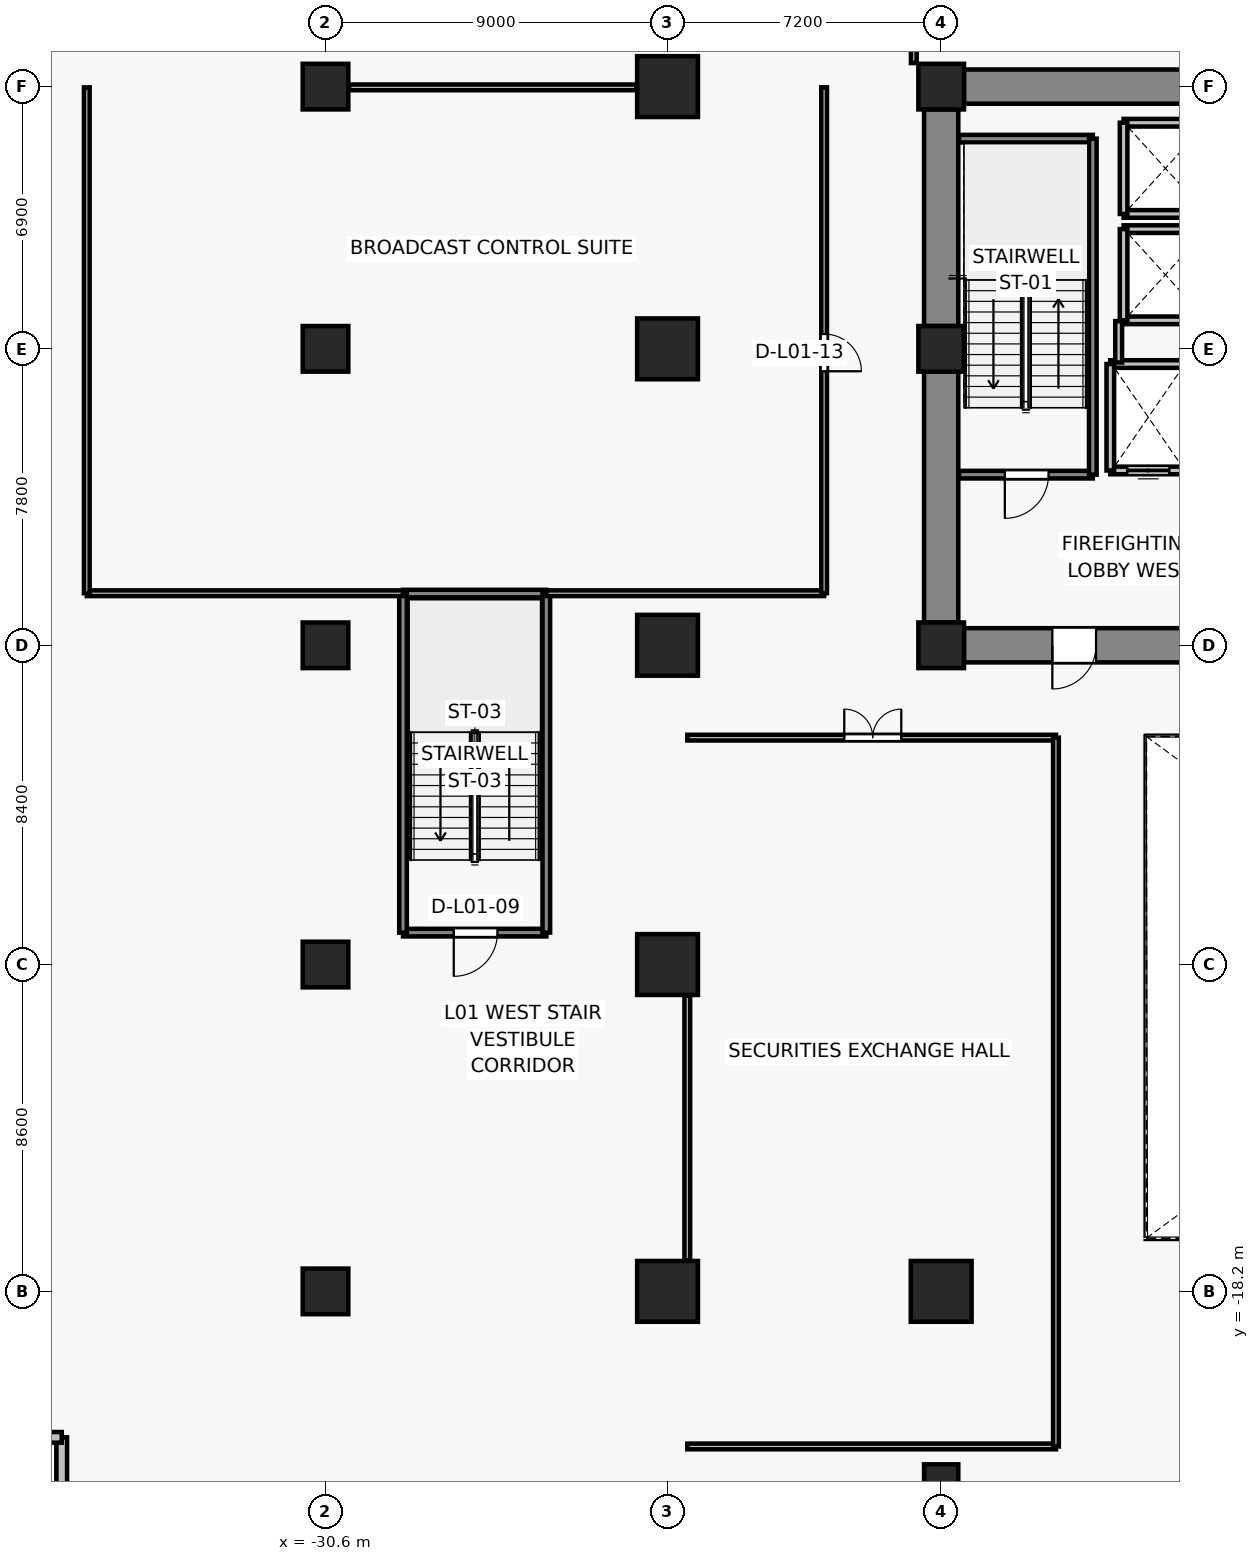
"""IFC4 building model, lengths in metres.
Left out: names, types, materials, properties, quantities, classifications, styles, units other than length and angle.
Written with IfcOpenShell. Run it as: python <this file> out.ifc"""

import sys

from ifc_helpers import new_model, si_unit, direction, frame, frame_2d, origin, origin_2d, place, context, subcontext, project, spatial, rectangle, extrude, source, transform, mapped, element, fill, save


model = new_model("IFC4")
c1 = context("Model", 3, precision=1e-05, world=origin(), true_north=direction((0.0, 1.0)))
c2 = subcontext(c1, "Body", "Model", "MODEL_VIEW")
j1 = project(units=[si_unit("LENGTHUNIT", "METRE"), si_unit("PLANEANGLEUNIT", "RADIAN")], contexts=[c1])
p1 = place(None, origin())
s1 = spatial("IfcSite", under=j1, at=p1, CompositionType="ELEMENT")
p2 = place(p1, origin())
s2 = spatial("IfcBuilding", under=s1, at=p2, CompositionType="ELEMENT")
p3 = place(p2, frame((0.0, 0.0, 5.0)))
s3 = spatial("IfcBuildingStorey", under=s2, at=p3, CompositionType="ELEMENT", Elevation=5.0)
for number, where, z_axis, x_axis in (
    (1, (-14.4, -1.2, 0.0), (0.0, 0.0, 1.0), (1.0, 0.0, 0.0)),
    (2, (-14.4, 6.6, 0.0), (0.0, 0.0, 1.0), (1.0, 0.0, 0.0)),
    (3, (-14.4, 13.5, 0.0), (0.0, 0.0, 1.0), (1.0, 0.0, 0.0)),
):
    element("IfcColumn", number, at=place(p3, frame(where, z_axis=z_axis, x_axis=x_axis)), inside=s3, PredefinedType="COLUMN", context=c2, shape_type="SweptSolid", body=[
        extrude(rectangle(XDim=1.2, YDim=1.2, at=origin_2d()), origin(), (0.0, 0.0, 1.0), 4.4),
    ])
for number, where, z_axis, x_axis in (
    (4, (-21.6, -18.2, 0.0), (0.0, 0.0, 1.0), (1.0, 0.0, 0.0)),
    (5, (-14.4, -18.2, 0.0), (0.0, 0.0, 1.0), (1.0, 0.0, 0.0)),
    (6, (-21.6, -9.6, 0.0), (0.0, 0.0, 1.0), (1.0, 0.0, 0.0)),
    (7, (-21.6, -1.2, 0.0), (0.0, 0.0, 1.0), (1.0, 0.0, 0.0)),
    (8, (-21.6, 6.6, 0.0), (0.0, 0.0, 1.0), (1.0, 0.0, 0.0)),
    (9, (-21.6, 13.5, 0.0), (0.0, 0.0, 1.0), (1.0, 0.0, 0.0)),
):
    element("IfcColumn", number, at=place(p3, frame(where, z_axis=z_axis, x_axis=x_axis)), inside=s3, PredefinedType="COLUMN", context=c2, shape_type="SweptSolid", body=[
        extrude(rectangle(XDim=1.6, YDim=1.6, at=origin_2d()), origin(), (0.0, 0.0, 1.0), 4.4),
    ])
for number, where, z_axis, x_axis in (
    (10, (-30.6, -18.2, 0.0), (0.0, 0.0, 1.0), (1.0, 0.0, 0.0)),
    (11, (-30.6, -9.6, 0.0), (0.0, 0.0, 1.0), (1.0, 0.0, 0.0)),
    (12, (-30.6, -1.2, 0.0), (0.0, 0.0, 1.0), (1.0, 0.0, 0.0)),
    (13, (-30.6, 6.6, 0.0), (0.0, 0.0, 1.0), (1.0, 0.0, 0.0)),
    (14, (-30.6, 13.5, 0.0), (0.0, 0.0, 1.0), (1.0, 0.0, 0.0)),
):
    element("IfcColumn", number, at=place(p3, frame(where, z_axis=z_axis, x_axis=x_axis)), inside=s3, PredefinedType="COLUMN", context=c2, shape_type="SweptSolid", body=[
        extrude(rectangle(XDim=1.2, YDim=1.2, at=origin_2d()), origin(), (0.0, 0.0, 1.0), 4.4),
    ])
p4 = place(p3, frame((-14.4, -23.2, 0.0), z_axis=(0.0, 0.0, 1.0), x_axis=(1.0, 0.0, 0.0)))
e15 = element("IfcColumn", 15, at=p4, inside=s3, PredefinedType="COLUMN", context=c2, shape_type="SweptSolid", body=[
    extrude(rectangle(XDim=0.9, YDim=0.9, at=origin_2d()), origin(), (0.0, 0.0, 1.0), 4.4),
])
p5 = place(p3, frame((-13.8, 13.5, 0.0), z_axis=(0.0, 0.0, 1.0), x_axis=(1.0, 0.0, 0.0)))
e16 = element("IfcWall", 16, at=p5, inside=s3, PredefinedType="SHEAR", context=c2, shape_type="SweptSolid", body=[
    extrude(rectangle(XDim=6.0, YDim=0.9, at=frame_2d((3.0, 0.0))), origin(), (0.0, 0.0, 1.0), 4.1),
])
p6 = place(p3, frame((-14.4, -0.6, 0.0), z_axis=(0.0, 0.0, 1.0), x_axis=(0.0, 1.0, 0.0)))
e17 = element("IfcWall", 17, at=p6, inside=s3, PredefinedType="SHEAR", context=c2, shape_type="SweptSolid", body=[
    extrude(rectangle(XDim=6.6, YDim=0.9, at=frame_2d((3.3, 0.0))), origin(), (0.0, 0.0, 1.0), 4.1),
])
p7 = place(p3, frame((-14.4, 7.2, 0.0), z_axis=(0.0, 0.0, 1.0), x_axis=(0.0, 1.0, 0.0)))
e18 = element("IfcWall", 18, at=p7, inside=s3, PredefinedType="SHEAR", context=c2, shape_type="SweptSolid", body=[
    extrude(rectangle(XDim=5.7, YDim=0.9, at=frame_2d((2.85, 0.0))), origin(), (0.0, 0.0, 1.0), 4.1),
])
p8 = place(p3, frame((-7.8, -1.2, 0.0), z_axis=(0.0, 0.0, 1.0), x_axis=(-1.0, 0.0, 0.0)))
e19 = element("IfcWall", 19, at=p8, inside=s3, PredefinedType="SHEAR", context=c2, shape_type="SweptSolid", body=[
    extrude(rectangle(XDim=6.0, YDim=0.9, at=frame_2d((3.0, 0.0))), origin(), (0.0, 0.0, 1.0), 4.1),
])
p9 = place(p8, frame((2.525, 0.0, 0.0)))
e20 = element("IfcOpeningElement", 20, at=p9, cuts=e19, PredefinedType="OPENING", context=c2, shape_type="SweptSolid", body=[
    extrude(rectangle(XDim=1.15, YDim=2.15, at=frame_2d((0.575, 1.075))), frame((0.0, 0.46, 0.0), z_axis=(0.0, -1.0, 0.0), x_axis=(1.0, 0.0, 0.0)), (0.0, 0.0, 1.0), 0.92),
])
for number, where, z_axis, x_axis in (
    (21, (-37.54, -22.04, 0.0), (0.0, 0.0, 1.0), (0.0, -1.0, 0.0)),
    (22, (-39.04, -22.04, 0.0), (0.0, 0.0, 1.0), (1.0, 0.0, 0.0)),
):
    element("IfcWall", number, at=place(p3, frame(where, z_axis=z_axis, x_axis=x_axis)), inside=s3, PredefinedType="SOLIDWALL", context=c2, shape_type="SweptSolid", body=[
        extrude(rectangle(XDim=1.5, YDim=0.28, at=frame_2d((0.75, 0.0))), origin(), (0.0, 0.0, 1.0), 4.1),
    ])
p10 = place(p3, frame((-7.95, 3.4, 0.0), z_axis=(0.0, 0.0, 1.0), x_axis=(-1.0, 0.0, 0.0)))
e23 = element("IfcWall", 23, at=p10, inside=s3, PredefinedType="SOLIDWALL", context=c2, shape_type="SweptSolid", body=[
    extrude(rectangle(XDim=2.0, YDim=0.2, at=frame_2d((1.0, 0.0))), origin(), (0.0, 0.0, 1.0), 4.1),
])
p11 = place(p10, frame((0.45, 0.0, 0.0)))
e24 = element("IfcOpeningElement", 24, at=p11, cuts=e23, PredefinedType="OPENING", context=c2, shape_type="SweptSolid", body=[
    extrude(rectangle(XDim=1.1, YDim=2.2, at=frame_2d((0.55, 1.1))), frame((0.0, 0.11, 0.0), z_axis=(0.0, -1.0, 0.0), x_axis=(1.0, 0.0, 0.0)), (0.0, 0.0, 1.0), 0.22),
])
p12 = place(p3, frame((-9.95, 6.2, 0.0), z_axis=(0.0, 0.0, 1.0), x_axis=(1.0, 0.0, 0.0)))
e25 = element("IfcWall", 25, at=p12, inside=s3, PredefinedType="SOLIDWALL", context=c2, shape_type="SweptSolid", body=[
    extrude(rectangle(XDim=2.0, YDim=0.2, at=frame_2d((1.0, 0.0))), origin(), (0.0, 0.0, 1.0), 4.1),
])
p13 = place(p3, frame((-9.95, 3.4, 0.0), z_axis=(0.0, 0.0, 1.0), x_axis=(0.0, 1.0, 0.0)))
e26 = element("IfcWall", 26, at=p13, inside=s3, PredefinedType="SOLIDWALL", context=c2, shape_type="SweptSolid", body=[
    extrude(rectangle(XDim=2.8, YDim=0.2, at=frame_2d((1.4, 0.0))), origin(), (0.0, 0.0, 1.0), 4.1),
])
for number, where, z_axis, x_axis in (
    (27, (-7.4, 7.35, 0.0), (0.0, 0.0, 1.0), (-1.0, 0.0, 0.0)),
    (28, (-9.6, 9.75, 0.0), (0.0, 0.0, 1.0), (1.0, 0.0, 0.0)),
):
    element("IfcWall", number, at=place(p3, frame(where, z_axis=z_axis, x_axis=x_axis)), inside=s3, PredefinedType="SOLIDWALL", context=c2, shape_type="SweptSolid", body=[
        extrude(rectangle(XDim=2.2, YDim=0.2, at=frame_2d((1.1, 0.0))), origin(), (0.0, 0.0, 1.0), 3.19),
    ])
p14 = place(p3, frame((-9.6, 7.35, 0.0), z_axis=(0.0, 0.0, 1.0), x_axis=(0.0, 1.0, 0.0)))
e29 = element("IfcWall", 29, at=p14, inside=s3, PredefinedType="SOLIDWALL", context=c2, shape_type="SweptSolid", body=[
    extrude(rectangle(XDim=2.4, YDim=0.2, at=frame_2d((1.2, 0.0))), origin(), (0.0, 0.0, 1.0), 4.1),
])
for number, where, z_axis, x_axis in (
    (30, (-7.4, 10.15, 0.0), (0.0, 0.0, 1.0), (-1.0, 0.0, 0.0)),
    (31, (-9.6, 12.55, 0.0), (0.0, 0.0, 1.0), (1.0, 0.0, 0.0)),
):
    element("IfcWall", number, at=place(p3, frame(where, z_axis=z_axis, x_axis=x_axis)), inside=s3, PredefinedType="SOLIDWALL", context=c2, shape_type="SweptSolid", body=[
        extrude(rectangle(XDim=2.2, YDim=0.2, at=frame_2d((1.1, 0.0))), origin(), (0.0, 0.0, 1.0), 3.19),
    ])
p15 = place(p3, frame((-9.6, 10.15, 0.0), z_axis=(0.0, 0.0, 1.0), x_axis=(0.0, 1.0, 0.0)))
e32 = element("IfcWall", 32, at=p15, inside=s3, PredefinedType="SOLIDWALL", context=c2, shape_type="SweptSolid", body=[
    extrude(rectangle(XDim=2.4, YDim=0.2, at=frame_2d((1.2, 0.0))), origin(), (0.0, 0.0, 1.0), 4.1),
])
p16 = place(p3, frame((-10.41, 3.29, 0.0), z_axis=(0.0, 0.0, 1.0), x_axis=(-1.0, 0.0, 0.0)))
e33 = element("IfcWall", 33, at=p16, inside=s3, PredefinedType="SOLIDWALL", context=c2, shape_type="SweptSolid", body=[
    extrude(rectangle(XDim=3.52, YDim=0.2, at=frame_2d((1.76, 0.0))), origin(), (0.0, 0.0, 1.0), 4.1),
])
p17 = place(p16, frame((1.165, 0.0, 0.0)))
e34 = element("IfcOpeningElement", 34, at=p17, cuts=e33, PredefinedType="OPENING", context=c2, shape_type="SweptSolid", body=[
    extrude(rectangle(XDim=1.15, YDim=2.15, at=frame_2d((0.575, 1.075))), frame((0.0, 0.11, 0.0), z_axis=(0.0, -1.0, 0.0), x_axis=(1.0, 0.0, 0.0)), (0.0, 0.0, 1.0), 0.22),
])
p18 = place(p3, frame((-13.93, 12.13, 0.0), z_axis=(0.0, 0.0, 1.0), x_axis=(1.0, 0.0, 0.0)))
e35 = element("IfcWall", 35, at=p18, inside=s3, PredefinedType="SOLIDWALL", context=c2, shape_type="SweptSolid", body=[
    extrude(rectangle(XDim=3.52, YDim=0.2, at=frame_2d((1.76, 0.0))), origin(), (0.0, 0.0, 1.0), 4.1),
])
p19 = place(p3, frame((-10.41, 12.13, 0.0), z_axis=(0.0, 0.0, 1.0), x_axis=(0.0, -1.0, 0.0)))
e36 = element("IfcWall", 36, at=p19, inside=s3, PredefinedType="SOLIDWALL", context=c2, shape_type="SweptSolid", body=[
    extrude(rectangle(XDim=8.84, YDim=0.2, at=frame_2d((4.42, 0.0))), origin(), (0.0, 0.0, 1.0), 4.1),
])
p20 = place(p3, frame((-9.73, 6.24, 0.0), z_axis=(0.0, 0.0, 1.0), x_axis=(0.0, 1.0, 0.0)))
e37 = element("IfcWall", 37, at=p20, inside=s3, PredefinedType="PARTITIONING", context=c2, shape_type="SweptSolid", body=[
    extrude(rectangle(XDim=1.09, YDim=0.18, at=frame_2d((0.545, 0.0))), origin(), (0.0, 0.0, 1.0), 4.1),
])
p21 = place(p3, frame((-24.79, -8.76, 0.0), z_axis=(0.0, 0.0, 1.0), x_axis=(-1.0, 0.0, 0.0)))
e38 = element("IfcWall", 38, at=p21, inside=s3, PredefinedType="SOLIDWALL", context=c2, shape_type="SweptSolid", body=[
    extrude(rectangle(XDim=3.77, YDim=0.2, at=frame_2d((1.885, 0.0))), origin(), (0.0, 0.0, 1.0), 4.1),
])
p22 = place(p21, frame((1.285, 0.0, 0.0)))
e39 = element("IfcOpeningElement", 39, at=p22, cuts=e38, PredefinedType="OPENING", context=c2, shape_type="SweptSolid", body=[
    extrude(rectangle(XDim=1.15, YDim=2.15, at=frame_2d((0.575, 1.075))), frame((0.0, 0.11, 0.0), z_axis=(0.0, -1.0, 0.0), x_axis=(1.0, 0.0, 0.0)), (0.0, 0.0, 1.0), 0.22),
])
p23 = place(p3, frame((-28.56, 0.16, 0.0), z_axis=(0.0, 0.0, 1.0), x_axis=(1.0, 0.0, 0.0)))
e40 = element("IfcWall", 40, at=p23, inside=s3, PredefinedType="SOLIDWALL", context=c2, shape_type="SweptSolid", body=[
    extrude(rectangle(XDim=3.77, YDim=0.2, at=frame_2d((1.885, 0.0))), origin(), (0.0, 0.0, 1.0), 4.1),
])
for number, where, z_axis, x_axis in (
    (41, (-28.56, -8.76, 0.0), (0.0, 0.0, 1.0), (0.0, 1.0, 0.0)),
    (42, (-24.79, 0.16, 0.0), (0.0, 0.0, 1.0), (0.0, -1.0, 0.0)),
):
    element("IfcWall", number, at=place(p3, frame(where, z_axis=z_axis, x_axis=x_axis)), inside=s3, PredefinedType="SOLIDWALL", context=c2, shape_type="SweptSolid", body=[
        extrude(rectangle(XDim=8.92, YDim=0.2, at=frame_2d((4.46, 0.0))), origin(), (0.0, 0.0, 1.0), 4.1),
    ])
p24 = place(p3, frame((-11.38, -22.28, 0.0), z_axis=(0.0, 0.0, 1.0), x_axis=(-1.0, 0.0, 0.0)))
e43 = element("IfcWall", 43, at=p24, inside=s3, PredefinedType="PARTITIONING", context=c2, shape_type="SweptSolid", body=[
    extrude(rectangle(XDim=9.7, YDim=0.15, at=frame_2d((4.85, 0.0))), origin(), (0.0, 0.0, 1.0), 3.19),
])
p25 = place(p3, frame((-21.08, -3.63, 0.0), z_axis=(0.0, 0.0, 1.0), x_axis=(1.0, 0.0, 0.0)))
e44 = element("IfcWall", 44, at=p25, inside=s3, PredefinedType="PARTITIONING", context=c2, shape_type="SweptSolid", body=[
    extrude(rectangle(XDim=9.7, YDim=0.15, at=frame_2d((4.85, 0.0))), origin(), (0.0, 0.0, 1.0), 3.239),
])
p26 = place(p25, frame((4.13, 0.0, 0.0)))
e45 = element("IfcOpeningElement", 45, at=p26, cuts=e44, PredefinedType="OPENING", context=c2, shape_type="SweptSolid", body=[
    extrude(rectangle(XDim=1.5, YDim=2.2, at=frame_2d((0.75, 1.1))), frame((0.0, 0.085, 0.0), z_axis=(0.0, -1.0, 0.0), x_axis=(1.0, 0.0, 0.0)), (0.0, 0.0, 1.0), 0.17),
])
p27 = place(p3, frame((-21.08, -17.38, 0.0), z_axis=(0.0, 0.0, 1.0), x_axis=(0.0, 1.0, 0.0)))
e46 = element("IfcWall", 46, at=p27, inside=s3, PredefinedType="PARTITIONING", context=c2, shape_type="SweptSolid", body=[
    extrude(rectangle(XDim=6.96, YDim=0.15, at=frame_2d((3.48, 0.0))), origin(), (0.0, 0.0, 1.0), 3.29),
])
p28 = place(p3, frame((-11.38, -3.63, 0.0), z_axis=(0.0, 0.0, 1.0), x_axis=(0.0, -1.0, 0.0)))
e47 = element("IfcWall", 47, at=p28, inside=s3, PredefinedType="PARTITIONING", context=c2, shape_type="SweptSolid", body=[
    extrude(rectangle(XDim=18.65, YDim=0.15, at=frame_2d((9.325, 0.0))), origin(), (0.0, 0.0, 1.0), 3.19),
])
p29 = place(p3, frame((-28.56, 0.17, 0.0), z_axis=(0.0, 0.0, 1.0), x_axis=(-1.0, 0.0, 0.0)))
e48 = element("IfcWall", 48, at=p29, inside=s3, PredefinedType="PARTITIONING", context=c2, shape_type="SweptSolid", body=[
    extrude(rectangle(XDim=8.32, YDim=0.15, at=frame_2d((4.16, 0.0))), origin(), (0.0, 0.0, 1.0), 3.19),
])
p30 = place(p3, frame((-17.48, 0.17, 0.0), z_axis=(0.0, 0.0, 1.0), x_axis=(-1.0, 0.0, 0.0)))
e49 = element("IfcWall", 49, at=p30, inside=s3, PredefinedType="PARTITIONING", context=c2, shape_type="SweptSolid", body=[
    extrude(rectangle(XDim=7.31, YDim=0.15, at=frame_2d((3.655, 0.0))), origin(), (0.0, 0.0, 1.0), 3.19),
])
p31 = place(p3, frame((-29.98, 13.48, 0.0), z_axis=(0.0, 0.0, 1.0), x_axis=(1.0, 0.0, 0.0)))
e50 = element("IfcWall", 50, at=p31, inside=s3, PredefinedType="PARTITIONING", context=c2, shape_type="SweptSolid", body=[
    extrude(rectangle(XDim=7.56, YDim=0.15, at=frame_2d((3.78, 0.0))), origin(), (0.0, 0.0, 1.0), 3.19),
])
p32 = place(p3, frame((-36.88, 0.17, 0.0), z_axis=(0.0, 0.0, 1.0), x_axis=(0.0, 1.0, 0.0)))
e51 = element("IfcWall", 51, at=p32, inside=s3, PredefinedType="PARTITIONING", context=c2, shape_type="SweptSolid", body=[
    extrude(rectangle(XDim=13.31, YDim=0.15, at=frame_2d((6.655, 0.0))), origin(), (0.0, 0.0, 1.0), 4.1),
])
p33 = place(p3, frame((-17.48, 13.48, 0.0), z_axis=(0.0, 0.0, 1.0), x_axis=(0.0, -1.0, 0.0)))
e52 = element("IfcWall", 52, at=p33, inside=s3, PredefinedType="PARTITIONING", context=c2, shape_type="SweptSolid", body=[
    extrude(rectangle(XDim=13.31, YDim=0.15, at=frame_2d((6.655, 0.0))), origin(), (0.0, 0.0, 1.0), 3.19),
])
p34 = place(p33, frame((6.49, 0.0, 0.0)))
e53 = element("IfcOpeningElement", 53, at=p34, cuts=e52, PredefinedType="OPENING", context=c2, shape_type="SweptSolid", body=[
    extrude(rectangle(XDim=0.98, YDim=2.15, at=frame_2d((0.49, 1.075))), frame((0.0, 0.085, 0.0), z_axis=(0.0, -1.0, 0.0), x_axis=(1.0, 0.0, 0.0)), (0.0, 0.0, 1.0), 0.17),
])
p35 = place(p3, frame((-15.12, 14.12, 0.0), z_axis=(0.0, 0.0, 1.0), x_axis=(0.0, 1.0, 0.0)))
e54 = element("IfcWall", 54, at=p35, inside=s3, PredefinedType="PARTITIONING", context=c2, shape_type="SweptSolid", body=[
    extrude(rectangle(XDim=8.76, YDim=0.15, at=frame_2d((4.38, 0.0))), origin(), (0.0, 0.0, 1.0), 3.19),
])
p36 = place(p35, frame((0.69, 0.0, 0.0)))
e55 = element("IfcOpeningElement", 55, at=p36, cuts=e54, PredefinedType="OPENING", context=c2, shape_type="SweptSolid", body=[
    extrude(rectangle(XDim=0.98, YDim=2.15, at=frame_2d((0.49, 1.075))), frame((0.0, 0.085, 0.0), z_axis=(0.0, -1.0, 0.0), x_axis=(1.0, 0.0, 0.0)), (0.0, 0.0, 1.0), 0.17),
])
m1 = source(origin(), c2, "Body", "SweptSolid", [
    extrude(rectangle(XDim=1.1, YDim=2.2, at=frame_2d((0.55, 1.1))), frame((0.0, 0.025, 0.0), z_axis=(0.0, -1.0, 0.0), x_axis=(1.0, 0.0, 0.0)), (0.0, 0.0, 1.0), 0.05),
])
p37 = place(p11, origin())
e56 = element("IfcDoor", 56, at=p37, inside=s3, OperationType="DOUBLE_DOOR_SLIDING", PredefinedType="DOOR", context=c2, shape_type="MappedRepresentation", body=[
    mapped(m1, transform((0.0, 0.0, 0.0), x_axis=(1.0, 0.0, 0.0), y_axis=(0.0, 1.0, 0.0), z_axis=(0.0, 0.0, 1.0), scale=1.0)),
])
fill(e24, e56)
m2 = source(origin(), c2, "Body", "SweptSolid", [
    extrude(rectangle(XDim=1.15, YDim=2.15, at=frame_2d((0.575, 1.075))), frame((0.0, 0.025, 0.0), z_axis=(0.0, -1.0, 0.0), x_axis=(1.0, 0.0, 0.0)), (0.0, 0.0, 1.0), 0.05),
])
p38 = place(p17, origin())
e57 = element("IfcDoor", 57, at=p38, inside=s3, OperationType="SINGLE_SWING_RIGHT", PredefinedType="DOOR", context=c2, shape_type="MappedRepresentation", body=[
    mapped(m2, transform((0.0, 0.0, 0.0), x_axis=(1.0, 0.0, 0.0), y_axis=(0.0, 1.0, 0.0), z_axis=(0.0, 0.0, 1.0), scale=1.0)),
])
fill(e34, e57)
p39 = place(p9, origin())
e58 = element("IfcDoor", 58, at=p39, inside=s3, OperationType="SINGLE_SWING_RIGHT", PredefinedType="DOOR", context=c2, shape_type="MappedRepresentation", body=[
    mapped(m2, transform((0.0, 0.0, 0.0), x_axis=(1.0, 0.0, 0.0), y_axis=(0.0, 1.0, 0.0), z_axis=(0.0, 0.0, 1.0), scale=1.0)),
])
fill(e20, e58)
p40 = place(p22, origin())
e59 = element("IfcDoor", 59, at=p40, inside=s3, OperationType="SINGLE_SWING_RIGHT", PredefinedType="DOOR", context=c2, shape_type="MappedRepresentation", body=[
    mapped(m2, transform((0.0, 0.0, 0.0), x_axis=(1.0, 0.0, 0.0), y_axis=(0.0, 1.0, 0.0), z_axis=(0.0, 0.0, 1.0), scale=1.0)),
])
fill(e39, e59)
m3 = source(origin(), c2, "Body", "SweptSolid", [
    extrude(rectangle(XDim=1.5, YDim=2.2, at=frame_2d((0.75, 1.1))), frame((0.0, 0.025, 0.0), z_axis=(0.0, -1.0, 0.0), x_axis=(1.0, 0.0, 0.0)), (0.0, 0.0, 1.0), 0.05),
])
p41 = place(p26, origin())
e60 = element("IfcDoor", 60, at=p41, inside=s3, OperationType="DOUBLE_DOOR_SINGLE_SWING", PredefinedType="DOOR", context=c2, shape_type="MappedRepresentation", body=[
    mapped(m3, transform((0.0, 0.0, 0.0), x_axis=(1.0, 0.0, 0.0), y_axis=(0.0, 1.0, 0.0), z_axis=(0.0, 0.0, 1.0), scale=1.0)),
])
fill(e45, e60)
m4 = source(origin(), c2, "Body", "SweptSolid", [
    extrude(rectangle(XDim=0.98, YDim=2.15, at=frame_2d((0.49, 1.075))), frame((0.0, 0.025, 0.0), z_axis=(0.0, -1.0, 0.0), x_axis=(1.0, 0.0, 0.0)), (0.0, 0.0, 1.0), 0.05),
])
p42 = place(p34, origin())
e61 = element("IfcDoor", 61, at=p42, inside=s3, OperationType="SINGLE_SWING_RIGHT", PredefinedType="DOOR", context=c2, shape_type="MappedRepresentation", body=[
    mapped(m4, transform((0.0, 0.0, 0.0), x_axis=(1.0, 0.0, 0.0), y_axis=(0.0, 1.0, 0.0), z_axis=(0.0, 0.0, 1.0), scale=1.0)),
])
fill(e53, e61)
save(model, sys.argv[1])
